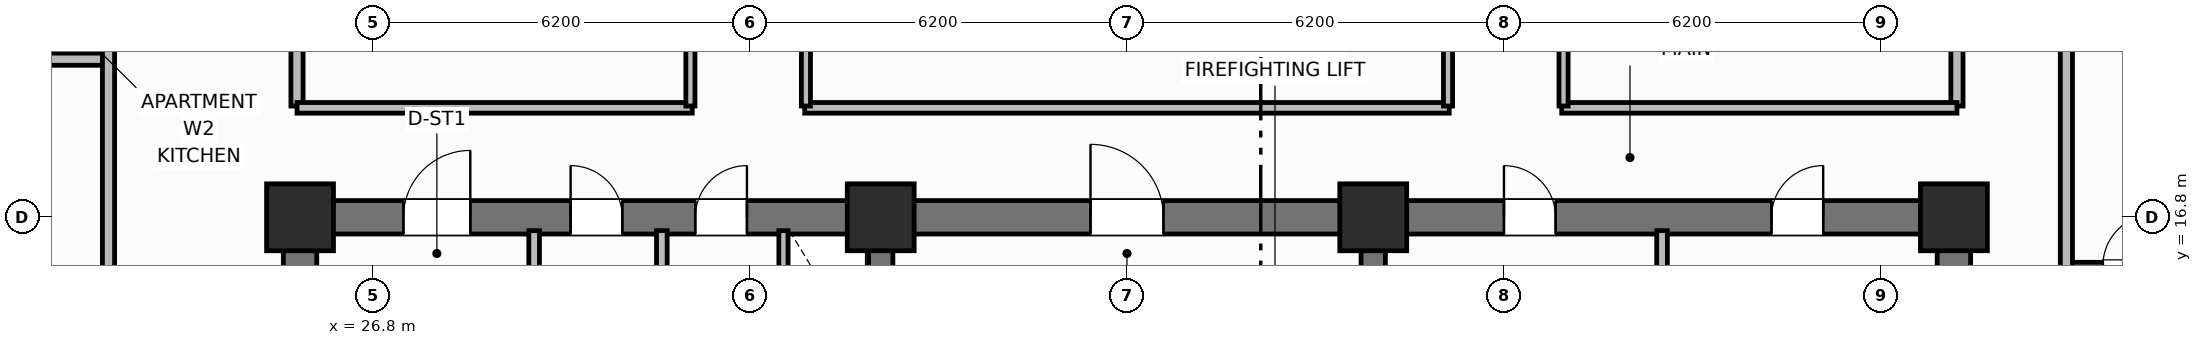
"""IFC4 building model, lengths in metres.
Left out: names, types, materials, properties, quantities, classifications, styles, units other than length and angle.
Written with IfcOpenShell. Run it as: python <this file> out.ifc"""

import sys

from ifc_helpers import new_model, si_unit, direction, frame, frame_2d, origin, origin_2d, place, context, subcontext, project, spatial, rectangle, extrude, element, fill, save


model = new_model("IFC4")
c1 = context("Model", 3, precision=1e-05, world=origin(), true_north=direction((0.0, 1.0)))
c2 = subcontext(c1, "Body", "Model", "MODEL_VIEW")
j1 = project(units=[si_unit("LENGTHUNIT", "METRE"), si_unit("PLANEANGLEUNIT", "RADIAN")], contexts=[c1])
p1 = place(None, origin())
s1 = spatial("IfcSite", under=j1, at=p1, CompositionType="ELEMENT")
p2 = place(p1, origin())
s2 = spatial("IfcBuilding", under=s1, at=p2, CompositionType="ELEMENT")
p3 = place(p2, frame((0.0, 0.0, 99.4)))
s3 = spatial("IfcBuildingStorey", under=s2, at=p3, CompositionType="ELEMENT", Elevation=99.4)
for number, where, z_axis, x_axis in (
    (1, (25.6, 10.875, 0.0), (0.0, 0.0, 1.0), (0.0, 1.0, 0.0)),
    (2, (52.8, 10.875, 0.0), (0.0, 0.0, 1.0), (0.0, 1.0, 0.0)),
):
    element("IfcWall", number, at=place(p3, frame(where, z_axis=z_axis, x_axis=x_axis)), inside=s3, PredefinedType="SHEAR", context=c2, shape_type="SweptSolid", body=[
        extrude(rectangle(XDim=5.65, YDim=0.55, at=frame_2d((2.825, 0.0))), origin(), (0.0, 0.0, 1.0), 3.7),
    ])
p4 = place(p3, frame((25.6, 16.8, 0.0), z_axis=(0.0, 0.0, 1.0), x_axis=(1.0, 0.0, 0.0)))
e3 = element("IfcWall", 3, at=p4, inside=s3, PredefinedType="SHEAR", context=c2, shape_type="SweptSolid", body=[
    extrude(rectangle(XDim=27.2, YDim=0.55, at=frame_2d((13.6, 0.0))), origin(), (0.0, 0.0, 1.0), 3.7),
])
p5 = place(p4, frame((1.7, 0.0, 0.0)))
e4 = element("IfcOpeningElement", 4, at=p5, cuts=e3, PredefinedType="OPENING", context=c2, shape_type="SweptSolid", body=[
    extrude(rectangle(XDim=1.1, YDim=2.15, at=frame_2d((0.55, 1.075))), frame((0.0, 0.285, 0.0), z_axis=(0.0, -1.0, 0.0), x_axis=(1.0, 0.0, 0.0)), (0.0, 0.0, 1.0), 0.57),
])
p6 = place(p4, frame((4.45, 0.0, 0.0)))
e5 = element("IfcOpeningElement", 5, at=p6, cuts=e3, PredefinedType="OPENING", context=c2, shape_type="SweptSolid", body=[
    extrude(rectangle(XDim=0.85, YDim=2.1, at=frame_2d((0.425, 1.05))), frame((0.0, 0.285, 0.0), z_axis=(0.0, -1.0, 0.0), x_axis=(1.0, 0.0, 0.0)), (0.0, 0.0, 1.0), 0.57),
])
p7 = place(p4, frame((6.5, 0.0, 0.0)))
e6 = element("IfcOpeningElement", 6, at=p7, cuts=e3, PredefinedType="OPENING", context=c2, shape_type="SweptSolid", body=[
    extrude(rectangle(XDim=0.85, YDim=2.1, at=frame_2d((0.425, 1.05))), frame((0.0, 0.285, 0.0), z_axis=(0.0, -1.0, 0.0), x_axis=(1.0, 0.0, 0.0)), (0.0, 0.0, 1.0), 0.57),
])
p8 = place(p4, frame((13.0, 0.0, 0.0)))
e7 = element("IfcOpeningElement", 7, at=p8, cuts=e3, PredefinedType="OPENING", context=c2, shape_type="SweptSolid", body=[
    extrude(rectangle(XDim=1.2, YDim=2.15, at=frame_2d((0.6, 1.075))), frame((0.0, 0.285, 0.0), z_axis=(0.0, -1.0, 0.0), x_axis=(1.0, 0.0, 0.0)), (0.0, 0.0, 1.0), 0.57),
])
p9 = place(p4, frame((19.8, 0.0, 0.0)))
e8 = element("IfcOpeningElement", 8, at=p9, cuts=e3, PredefinedType="OPENING", context=c2, shape_type="SweptSolid", body=[
    extrude(rectangle(XDim=0.85, YDim=2.1, at=frame_2d((0.425, 1.05))), frame((0.0, 0.285, 0.0), z_axis=(0.0, -1.0, 0.0), x_axis=(1.0, 0.0, 0.0)), (0.0, 0.0, 1.0), 0.57),
])
p10 = place(p4, frame((24.2, 0.0, 0.0)))
e9 = element("IfcOpeningElement", 9, at=p10, cuts=e3, PredefinedType="OPENING", context=c2, shape_type="SweptSolid", body=[
    extrude(rectangle(XDim=0.85, YDim=2.1, at=frame_2d((0.425, 1.05))), frame((0.0, 0.285, 0.0), z_axis=(0.0, -1.0, 0.0), x_axis=(1.0, 0.0, 0.0)), (0.0, 0.0, 1.0), 0.57),
])
for number, where, z_axis, x_axis in (
    (10, (35.15, 10.875, 0.0), (0.0, 0.0, 1.0), (0.0, 1.0, 0.0)),
    (11, (43.25, 10.875, 0.0), (0.0, 0.0, 1.0), (0.0, 1.0, 0.0)),
):
    element("IfcWall", number, at=place(p3, frame(where, z_axis=z_axis, x_axis=x_axis)), inside=s3, PredefinedType="SHEAR", context=c2, shape_type="SweptSolid", body=[
        extrude(rectangle(XDim=5.65, YDim=0.4, at=frame_2d((2.825, 0.0))), origin(), (0.0, 0.0, 1.0), 3.7),
    ])
for number, where, z_axis, x_axis in (
    (12, (25.6, 16.8, 0.0), (0.0, 0.0, 1.0), (1.0, 0.0, 0.0)),
    (13, (35.15, 16.8, 0.0), (0.0, 0.0, 1.0), (1.0, 0.0, 0.0)),
    (14, (43.25, 16.8, 0.0), (0.0, 0.0, 1.0), (1.0, 0.0, 0.0)),
    (15, (52.8, 16.8, 0.0), (0.0, 0.0, 1.0), (1.0, 0.0, 0.0)),
):
    element("IfcColumn", number, at=place(p3, frame(where, z_axis=z_axis, x_axis=x_axis)), inside=s3, PredefinedType="COLUMN", context=c2, shape_type="SweptSolid", body=[
        extrude(rectangle(XDim=1.1, YDim=1.1, at=origin_2d()), origin(), (0.0, 0.0, 1.0), 3.7),
    ])
for number, where, z_axis, x_axis in (
    (16, (29.45, 14.5, 0.0), (0.0, 0.0, 1.0), (0.0, 1.0, 0.0)),
    (17, (31.55, 14.5, 0.0), (0.0, 0.0, 1.0), (0.0, 1.0, 0.0)),
):
    element("IfcWall", number, at=place(p3, frame(where, z_axis=z_axis, x_axis=x_axis)), inside=s3, PredefinedType="PARTITIONING", context=c2, shape_type="SweptSolid", body=[
        extrude(rectangle(XDim=2.08, YDim=0.175, at=frame_2d((1.04, 0.0))), origin(), (0.0, 0.0, 1.0), 2.53),
    ])
p11 = place(p3, frame((33.55, 14.5, 0.0), z_axis=(0.0, 0.0, 1.0), x_axis=(0.0, 1.0, 0.0)))
e18 = element("IfcWall", 18, at=p11, inside=s3, PredefinedType="PARTITIONING", context=c2, shape_type="SweptSolid", body=[
    extrude(rectangle(XDim=2.08, YDim=0.15, at=frame_2d((1.04, 0.0))), origin(), (0.0, 0.0, 1.0), 2.53),
])
p12 = place(p11, frame((0.55, 0.0, 0.0)))
e19 = element("IfcOpeningElement", 19, at=p12, cuts=e18, PredefinedType="OPENING", context=c2, shape_type="SweptSolid", body=[
    extrude(rectangle(XDim=0.85, YDim=2.05, at=frame_2d((0.425, 1.025))), frame((0.0, 0.085, 0.0), z_axis=(0.0, -1.0, 0.0), x_axis=(1.0, 0.0, 0.0)), (0.0, 0.0, 1.0), 0.17),
])
p13 = place(p3, frame((48.0, 10.95, 0.0), z_axis=(0.0, 0.0, 1.0), x_axis=(0.0, 1.0, 0.0)))
e20 = element("IfcWall", 20, at=p13, inside=s3, PredefinedType="PARTITIONING", context=c2, shape_type="SweptSolid", body=[
    extrude(rectangle(XDim=5.63, YDim=0.175, at=frame_2d((2.815, 0.0))), origin(), (0.0, 0.0, 1.0), 2.53),
])
for number, where, z_axis, x_axis in (
    (21, (25.55, 18.63, 0.0), (0.0, 0.0, 1.0), (0.0, 1.0, 0.0)),
    (22, (52.85, 18.63, 0.0), (0.0, 0.0, 1.0), (0.0, 1.0, 0.0)),
):
    element("IfcWall", number, at=place(p3, frame(where, z_axis=z_axis, x_axis=x_axis)), inside=s3, PredefinedType="PARTITIONING", context=c2, shape_type="SweptSolid", body=[
        extrude(rectangle(XDim=19.14, YDim=0.2, at=frame_2d((9.57, 0.0))), origin(), (0.0, 0.0, 1.0), 2.53),
    ])
p14 = place(p3, frame((25.55, 18.6, 0.0), z_axis=(0.0, 0.0, 1.0), x_axis=(1.0, 0.0, 0.0)))
e23 = element("IfcWall", 23, at=p14, inside=s3, PredefinedType="PARTITIONING", context=c2, shape_type="SweptSolid", body=[
    extrude(rectangle(XDim=6.5, YDim=0.175, at=frame_2d((3.25, 0.0))), origin(), (0.0, 0.0, 1.0), 2.53),
])
p15 = place(p3, frame((33.9, 18.6, 0.0), z_axis=(0.0, 0.0, 1.0), x_axis=(1.0, 0.0, 0.0)))
e24 = element("IfcWall", 24, at=p15, inside=s3, PredefinedType="PARTITIONING", context=c2, shape_type="SweptSolid", body=[
    extrude(rectangle(XDim=10.6, YDim=0.175, at=frame_2d((5.3, 0.0))), origin(), (0.0, 0.0, 1.0), 2.53),
])
p16 = place(p3, frame((46.35, 18.6, 0.0), z_axis=(0.0, 0.0, 1.0), x_axis=(1.0, 0.0, 0.0)))
e25 = element("IfcWall", 25, at=p16, inside=s3, PredefinedType="PARTITIONING", context=c2, shape_type="SweptSolid", body=[
    extrude(rectangle(XDim=6.5, YDim=0.175, at=frame_2d((3.25, 0.0))), origin(), (0.0, 0.0, 1.0), 2.53),
])
p17 = place(p3, frame((32.02, 18.63, 0.0), z_axis=(0.0, 0.0, 1.0), x_axis=(0.0, 1.0, 0.0)))
e26 = element("IfcWall", 26, at=p17, inside=s3, PredefinedType="PARTITIONING", context=c2, shape_type="SweptSolid", body=[
    extrude(rectangle(XDim=19.14, YDim=0.15, at=frame_2d((9.57, 0.0))), origin(), (0.0, 0.0, 1.0), 2.53),
])
p18 = place(p17, frame((3.0, 0.0, 0.0)))
e27 = element("IfcOpeningElement", 27, at=p18, cuts=e26, PredefinedType="OPENING", context=c2, shape_type="SweptSolid", body=[
    extrude(rectangle(XDim=0.9, YDim=2.1, at=frame_2d((0.45, 1.05))), frame((0.0, 0.085, 0.0), z_axis=(0.0, -1.0, 0.0), x_axis=(1.0, 0.0, 0.0)), (0.0, 0.0, 1.0), 0.17),
])
p19 = place(p17, frame((11.5, 0.0, 0.0)))
e28 = element("IfcOpeningElement", 28, at=p19, cuts=e26, PredefinedType="OPENING", context=c2, shape_type="SweptSolid", body=[
    extrude(rectangle(XDim=0.9, YDim=2.1, at=frame_2d((0.45, 1.05))), frame((0.0, 0.085, 0.0), z_axis=(0.0, -1.0, 0.0), x_axis=(1.0, 0.0, 0.0)), (0.0, 0.0, 1.0), 0.17),
])
p20 = place(p3, frame((33.92, 18.63, 0.0), z_axis=(0.0, 0.0, 1.0), x_axis=(0.0, 1.0, 0.0)))
e29 = element("IfcWall", 29, at=p20, inside=s3, PredefinedType="PARTITIONING", context=c2, shape_type="SweptSolid", body=[
    extrude(rectangle(XDim=19.14, YDim=0.15, at=frame_2d((9.57, 0.0))), origin(), (0.0, 0.0, 1.0), 2.53),
])
p21 = place(p20, frame((2.4, 0.0, 0.0)))
e30 = element("IfcOpeningElement", 30, at=p21, cuts=e29, PredefinedType="OPENING", context=c2, shape_type="SweptSolid", body=[
    extrude(rectangle(XDim=0.9, YDim=2.1, at=frame_2d((0.45, 1.05))), frame((0.0, 0.085, 0.0), z_axis=(0.0, -1.0, 0.0), x_axis=(1.0, 0.0, 0.0)), (0.0, 0.0, 1.0), 0.17),
])
p22 = place(p3, frame((44.48, 18.63, 0.0), z_axis=(0.0, 0.0, 1.0), x_axis=(0.0, 1.0, 0.0)))
e31 = element("IfcWall", 31, at=p22, inside=s3, PredefinedType="PARTITIONING", context=c2, shape_type="SweptSolid", body=[
    extrude(rectangle(XDim=19.14, YDim=0.15, at=frame_2d((9.57, 0.0))), origin(), (0.0, 0.0, 1.0), 2.53),
])
p23 = place(p22, frame((9.847, 0.0, 0.0)))
e32 = element("IfcOpeningElement", 32, at=p23, cuts=e31, PredefinedType="OPENING", context=c2, shape_type="SweptSolid", body=[
    extrude(rectangle(XDim=0.9, YDim=2.1, at=frame_2d((0.45, 1.05))), frame((0.0, 0.085, 0.0), z_axis=(0.0, -1.0, 0.0), x_axis=(1.0, 0.0, 0.0)), (0.0, 0.0, 1.0), 0.17),
])
p24 = place(p3, frame((46.38, 18.63, 0.0), z_axis=(0.0, 0.0, 1.0), x_axis=(0.0, 1.0, 0.0)))
e33 = element("IfcWall", 33, at=p24, inside=s3, PredefinedType="PARTITIONING", context=c2, shape_type="SweptSolid", body=[
    extrude(rectangle(XDim=19.14, YDim=0.15, at=frame_2d((9.57, 0.0))), origin(), (0.0, 0.0, 1.0), 2.53),
])
p25 = place(p24, frame((5.5, 0.0, 0.0)))
e34 = element("IfcOpeningElement", 34, at=p25, cuts=e33, PredefinedType="OPENING", context=c2, shape_type="SweptSolid", body=[
    extrude(rectangle(XDim=1.0, YDim=2.15, at=frame_2d((0.5, 1.075))), frame((0.0, 0.085, 0.0), z_axis=(0.0, -1.0, 0.0), x_axis=(1.0, 0.0, 0.0)), (0.0, 0.0, 1.0), 0.17),
])
p26 = place(p3, frame((14.57, 19.4, 0.0), z_axis=(0.0, 0.0, 1.0), x_axis=(1.0, 0.0, 0.0)))
e35 = element("IfcWall", 35, at=p26, inside=s3, PredefinedType="PARTITIONING", context=c2, shape_type="SweptSolid", body=[
    extrude(rectangle(XDim=7.88, YDim=0.2, at=frame_2d((3.94, 0.0))), origin(), (0.0, 0.0, 1.0), 2.53),
])
p27 = place(p3, frame((22.45, 10.6, 0.0), z_axis=(0.0, 0.0, 1.0), x_axis=(0.0, 1.0, 0.0)))
e36 = element("IfcWall", 36, at=p27, inside=s3, PredefinedType="PARTITIONING", context=c2, shape_type="SweptSolid", body=[
    extrude(rectangle(XDim=35.2, YDim=0.2, at=frame_2d((17.6, 0.0))), origin(), (0.0, 0.0, 1.0), 2.53),
])
p28 = place(p27, frame((2.65, 0.0, 0.0)))
e37 = element("IfcOpeningElement", 37, at=p28, cuts=e36, PredefinedType="OPENING", context=c2, shape_type="SweptSolid", body=[
    extrude(rectangle(XDim=1.0, YDim=2.15, at=frame_2d((0.5, 1.075))), frame((0.0, 0.11, 0.0), z_axis=(0.0, -1.0, 0.0), x_axis=(1.0, 0.0, 0.0)), (0.0, 0.0, 1.0), 0.22),
])
p29 = place(p27, frame((10.81, 0.0, 0.0)))
e38 = element("IfcOpeningElement", 38, at=p29, cuts=e36, PredefinedType="OPENING", context=c2, shape_type="SweptSolid", body=[
    extrude(rectangle(XDim=1.0, YDim=2.15, at=frame_2d((0.5, 1.075))), frame((0.0, 0.11, 0.0), z_axis=(0.0, -1.0, 0.0), x_axis=(1.0, 0.0, 0.0)), (0.0, 0.0, 1.0), 0.22),
])
p30 = place(p27, frame((19.54, 0.0, 0.0)))
e39 = element("IfcOpeningElement", 39, at=p30, cuts=e36, PredefinedType="OPENING", context=c2, shape_type="SweptSolid", body=[
    extrude(rectangle(XDim=1.0, YDim=2.15, at=frame_2d((0.5, 1.075))), frame((0.0, 0.11, 0.0), z_axis=(0.0, -1.0, 0.0), x_axis=(1.0, 0.0, 0.0)), (0.0, 0.0, 1.0), 0.22),
])
p31 = place(p27, frame((26.95, 0.0, 0.0)))
e40 = element("IfcOpeningElement", 40, at=p31, cuts=e36, PredefinedType="OPENING", context=c2, shape_type="SweptSolid", body=[
    extrude(rectangle(XDim=1.0, YDim=2.15, at=frame_2d((0.5, 1.075))), frame((0.0, 0.11, 0.0), z_axis=(0.0, -1.0, 0.0), x_axis=(1.0, 0.0, 0.0)), (0.0, 0.0, 1.0), 0.22),
])
p32 = place(p3, frame((54.65, 16.0, 0.0), z_axis=(0.0, 0.0, 1.0), x_axis=(1.0, 0.0, 0.0)))
e41 = element("IfcWall", 41, at=p32, inside=s3, PredefinedType="PARTITIONING", context=c2, shape_type="SweptSolid", body=[
    extrude(rectangle(XDim=2.25, YDim=0.12, at=frame_2d((1.125, 0.0))), origin(), (0.0, 0.0, 1.0), 2.53),
])
p33 = place(p32, frame((0.6, 0.0, 0.0)))
e42 = element("IfcOpeningElement", 42, at=p33, cuts=e41, PredefinedType="OPENING", context=c2, shape_type="SweptSolid", body=[
    extrude(rectangle(XDim=0.85, YDim=2.1, at=frame_2d((0.425, 1.05))), frame((0.0, 0.07, 0.0), z_axis=(0.0, -1.0, 0.0), x_axis=(1.0, 0.0, 0.0)), (0.0, 0.0, 1.0), 0.14),
])
p34 = place(p3, frame((54.65, 10.6, 0.0), z_axis=(0.0, 0.0, 1.0), x_axis=(0.0, 1.0, 0.0)))
e43 = element("IfcWall", 43, at=p34, inside=s3, PredefinedType="PARTITIONING", context=c2, shape_type="SweptSolid", body=[
    extrude(rectangle(XDim=35.2, YDim=0.2, at=frame_2d((17.6, 0.0))), origin(), (0.0, 0.0, 1.0), 2.53),
])
p35 = place(p34, frame((2.65, 0.0, 0.0)))
e44 = element("IfcOpeningElement", 44, at=p35, cuts=e43, PredefinedType="OPENING", context=c2, shape_type="SweptSolid", body=[
    extrude(rectangle(XDim=1.0, YDim=2.15, at=frame_2d((0.5, 1.075))), frame((0.0, 0.11, 0.0), z_axis=(0.0, -1.0, 0.0), x_axis=(1.0, 0.0, 0.0)), (0.0, 0.0, 1.0), 0.22),
])
p36 = place(p34, frame((19.95, 0.0, 0.0)))
e45 = element("IfcOpeningElement", 45, at=p36, cuts=e43, PredefinedType="OPENING", context=c2, shape_type="SweptSolid", body=[
    extrude(rectangle(XDim=1.0, YDim=2.15, at=frame_2d((0.5, 1.075))), frame((0.0, 0.11, 0.0), z_axis=(0.0, -1.0, 0.0), x_axis=(1.0, 0.0, 0.0)), (0.0, 0.0, 1.0), 0.22),
])
p37 = place(p33, origin())
e46 = element("IfcDoor", 46, at=p37, inside=s3, OperationType="SINGLE_SWING_RIGHT", PredefinedType="DOOR", context=c2, shape_type="SweptSolid", body=[
    extrude(rectangle(XDim=0.85, YDim=2.1, at=frame_2d((0.425, 1.05))), frame((0.0, 0.025, 0.0), z_axis=(0.0, -1.0, 0.0), x_axis=(1.0, 0.0, 0.0)), (0.0, 0.0, 1.0), 0.05),
])
fill(e42, e46)
p38 = place(p5, origin())
e47 = element("IfcDoor", 47, at=p38, inside=s3, OperationType="SINGLE_SWING_RIGHT", PredefinedType="DOOR", context=c2, shape_type="SweptSolid", body=[
    extrude(rectangle(XDim=1.1, YDim=2.15, at=frame_2d((0.55, 1.075))), frame((0.0, 0.025, 0.0), z_axis=(0.0, -1.0, 0.0), x_axis=(1.0, 0.0, 0.0)), (0.0, 0.0, 1.0), 0.05),
])
fill(e4, e47)
p39 = place(p6, origin())
e48 = element("IfcDoor", 48, at=p39, inside=s3, OperationType="SINGLE_SWING_LEFT", PredefinedType="DOOR", context=c2, shape_type="SweptSolid", body=[
    extrude(rectangle(XDim=0.85, YDim=2.1, at=frame_2d((0.425, 1.05))), frame((0.0, 0.025, 0.0), z_axis=(0.0, -1.0, 0.0), x_axis=(1.0, 0.0, 0.0)), (0.0, 0.0, 1.0), 0.05),
])
fill(e5, e48)
p40 = place(p7, origin())
e49 = element("IfcDoor", 49, at=p40, inside=s3, OperationType="SINGLE_SWING_RIGHT", PredefinedType="DOOR", context=c2, shape_type="SweptSolid", body=[
    extrude(rectangle(XDim=0.85, YDim=2.1, at=frame_2d((0.425, 1.05))), frame((0.0, 0.025, 0.0), z_axis=(0.0, -1.0, 0.0), x_axis=(1.0, 0.0, 0.0)), (0.0, 0.0, 1.0), 0.05),
])
fill(e6, e49)
p41 = place(p8, origin())
e50 = element("IfcDoor", 50, at=p41, inside=s3, OperationType="SINGLE_SWING_LEFT", PredefinedType="DOOR", context=c2, shape_type="SweptSolid", body=[
    extrude(rectangle(XDim=1.2, YDim=2.15, at=frame_2d((0.6, 1.075))), frame((0.0, 0.025, 0.0), z_axis=(0.0, -1.0, 0.0), x_axis=(1.0, 0.0, 0.0)), (0.0, 0.0, 1.0), 0.05),
])
fill(e7, e50)
p42 = place(p9, origin())
e51 = element("IfcDoor", 51, at=p42, inside=s3, OperationType="SINGLE_SWING_LEFT", PredefinedType="DOOR", context=c2, shape_type="SweptSolid", body=[
    extrude(rectangle(XDim=0.85, YDim=2.1, at=frame_2d((0.425, 1.05))), frame((0.0, 0.025, 0.0), z_axis=(0.0, -1.0, 0.0), x_axis=(1.0, 0.0, 0.0)), (0.0, 0.0, 1.0), 0.05),
])
fill(e8, e51)
p43 = place(p10, origin())
e52 = element("IfcDoor", 52, at=p43, inside=s3, OperationType="SINGLE_SWING_RIGHT", PredefinedType="DOOR", context=c2, shape_type="SweptSolid", body=[
    extrude(rectangle(XDim=0.85, YDim=2.1, at=frame_2d((0.425, 1.05))), frame((0.0, 0.025, 0.0), z_axis=(0.0, -1.0, 0.0), x_axis=(1.0, 0.0, 0.0)), (0.0, 0.0, 1.0), 0.05),
])
fill(e9, e52)
save(model, sys.argv[1])
